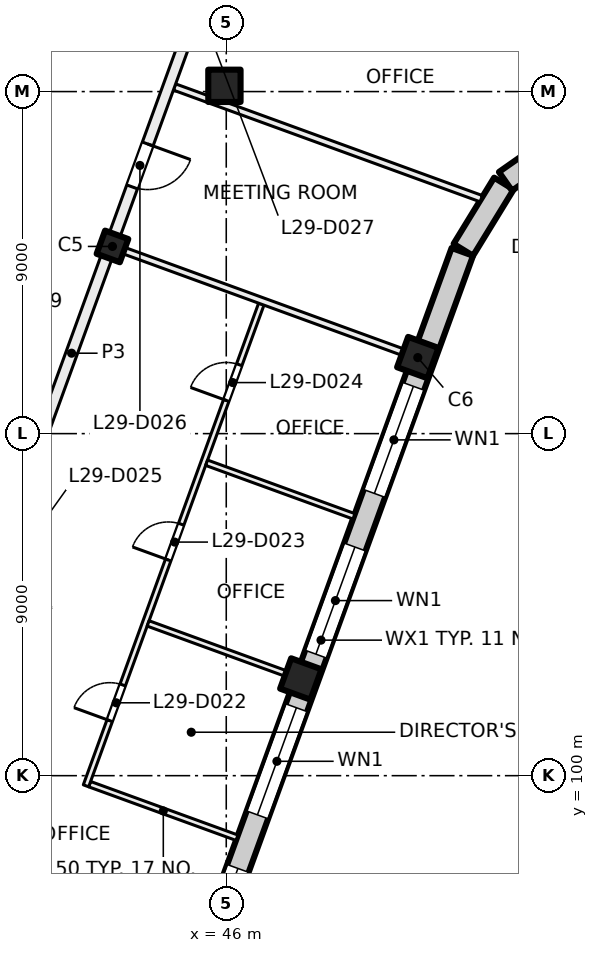
"""IFC4 building model, lengths in metres.
Left out: names, types, materials, properties, quantities, classifications, styles, units other than length and angle.
Written with IfcOpenShell. Run it as: python <this file> out.ifc"""

import sys

from ifc_helpers import new_model, si_unit, direction, frame, frame_2d, origin, origin_2d, place, context, subcontext, project, spatial, rectangle, extrude, element, fill, save


model = new_model("IFC4")
c1 = context("Model", 3, precision=1e-05, world=origin(), true_north=direction((0.0, 1.0)))
c2 = subcontext(c1, "Body", "Model", "MODEL_VIEW")
j1 = project(units=[si_unit("LENGTHUNIT", "METRE"), si_unit("PLANEANGLEUNIT", "RADIAN")], contexts=[c1])
p1 = place(None, origin())
s1 = spatial("IfcSite", under=j1, at=p1, CompositionType="ELEMENT")
p2 = place(p1, origin())
s2 = spatial("IfcBuilding", under=s1, at=p2, CompositionType="ELEMENT")
p3 = place(p2, frame((0.0, 0.0, 125.0)))
s3 = spatial("IfcBuildingStorey", under=s2, at=p3, CompositionType="ELEMENT", Elevation=125.0)
p4 = place(p3, frame((45.952, 118.152, 0.0), z_axis=(0.0, 0.0, 1.0), x_axis=(1.0, 0.0, 0.0)))
e1 = element("IfcColumn", 1, at=p4, inside=s3, PredefinedType="COLUMN", context=c2, shape_type="SweptSolid", body=[
    extrude(rectangle(XDim=0.85, YDim=0.85, at=origin_2d()), origin(), (0.0, 0.0, 1.0), 4.0),
])
p5 = place(p3, frame((43.006, 113.925, 0.0), z_axis=(0.0, 0.0, 1.0), x_axis=(-0.342020143326, -0.939692620786, 0.0)))
e2 = element("IfcColumn", 2, at=p5, inside=s3, PredefinedType="COLUMN", context=c2, shape_type="SweptSolid", body=[
    extrude(rectangle(XDim=0.65, YDim=0.65, at=origin_2d()), origin(), (0.0, 0.0, 1.0), 4.0),
])
for number, where, z_axis, x_axis in (
    (3, (51.04, 111.001, 0.0), (0.0, 0.0, 1.0), (-0.342, -0.94, 0.0)),
    (4, (47.962, 102.544, 0.0), (0.0, 0.0, 1.0), (-0.342, -0.94, 0.0)),
):
    element("IfcColumn", number, at=place(p3, frame(where, z_axis=z_axis, x_axis=x_axis)), inside=s3, PredefinedType="COLUMN", context=c2, shape_type="SweptSolid", body=[
        extrude(rectangle(XDim=0.85, YDim=0.85, at=origin_2d()), origin(), (0.0, 0.0, 1.0), 4.0),
    ])
p6 = place(p3, frame((52.212, 113.783, 0.0), z_axis=(0.0, 0.0, 1.0), x_axis=(-0.34202521188, -0.939690775968, 0.0)))
e5 = element("IfcWall", 5, at=p6, inside=s3, PredefinedType="SOLIDWALL", context=c2, shape_type="SweptSolid", body=[
    extrude(rectangle(XDim=21.745, YDim=0.6, at=frame_2d((10.873, 0.0))), origin(), (0.0, 0.0, 1.0), 3.625),
])
p7 = place(p6, frame((3.765, 0.0, 0.9)))
e6 = element("IfcOpeningElement", 6, at=p7, cuts=e5, PredefinedType="OPENING", context=c2, shape_type="SweptSolid", body=[
    extrude(rectangle(XDim=3.0, YDim=2.4, at=frame_2d((1.5, 1.2))), frame((0.0, 0.31, 0.0), z_axis=(0.0, -1.0, 0.0), x_axis=(1.0, 0.0, 0.0)), (0.0, 0.0, 1.0), 0.62),
])
p8 = place(p6, frame((8.265, 0.0, 0.9)))
e7 = element("IfcOpeningElement", 7, at=p8, cuts=e5, PredefinedType="OPENING", context=c2, shape_type="SweptSolid", body=[
    extrude(rectangle(XDim=3.0, YDim=2.4, at=frame_2d((1.5, 1.2))), frame((0.0, 0.31, 0.0), z_axis=(0.0, -1.0, 0.0), x_axis=(1.0, 0.0, 0.0)), (0.0, 0.0, 1.0), 0.62),
])
p9 = place(p6, frame((12.765, 0.0, 0.9)))
e8 = element("IfcOpeningElement", 8, at=p9, cuts=e5, PredefinedType="OPENING", context=c2, shape_type="SweptSolid", body=[
    extrude(rectangle(XDim=3.0, YDim=2.4, at=frame_2d((1.5, 1.2))), frame((0.0, 0.31, 0.0), z_axis=(0.0, -1.0, 0.0), x_axis=(1.0, 0.0, 0.0)), (0.0, 0.0, 1.0), 0.62),
])
p10 = place(p6, frame((17.265, 0.0, 0.9)))
e9 = element("IfcOpeningElement", 9, at=p10, cuts=e5, PredefinedType="OPENING", context=c2, shape_type="SweptSolid", body=[
    extrude(rectangle(XDim=3.0, YDim=2.4, at=frame_2d((1.5, 1.2))), frame((0.0, 0.31, 0.0), z_axis=(0.0, -1.0, 0.0), x_axis=(1.0, 0.0, 0.0)), (0.0, 0.0, 1.0), 0.62),
])
p11 = place(p3, frame((53.305, 115.578, 0.0), z_axis=(0.0, 0.0, 1.0), x_axis=(-0.522402266438, -0.852699168535, 0.0)))
e10 = element("IfcWall", 10, at=p11, inside=s3, PredefinedType="SOLIDWALL", context=c2, shape_type="SweptSolid", body=[
    extrude(rectangle(XDim=2.042, YDim=0.6, at=frame_2d((1.021, 0.0))), origin(), (0.0, 0.0, 1.0), 3.625),
])
p12 = place(p3, frame((55.062, 116.839, 0.0), z_axis=(0.0, 0.0, 1.0), x_axis=(-0.819122269495, -0.573618956815, 0.0)))
e11 = element("IfcWall", 11, at=p12, inside=s3, PredefinedType="SOLIDWALL", context=c2, shape_type="SweptSolid", body=[
    extrude(rectangle(XDim=2.092, YDim=0.6, at=frame_2d((1.046, 0.0))), origin(), (0.0, 0.0, 1.0), 3.625),
])
p13 = place(p3, frame((32.881, 97.657, 0.0), z_axis=(0.0, 0.0, 1.0), x_axis=(0.342017360004, 0.939693633828, 0.0)))
e12 = element("IfcWall", 12, at=p13, inside=s3, PredefinedType="PARTITIONING", context=c2, shape_type="SweptSolid", body=[
    extrude(rectangle(XDim=34.516, YDim=0.3, at=frame_2d((17.258, 0.0))), origin(), (0.0, 0.0, 1.0), 3.625),
])
p14 = place(p13, frame((4.275, 0.0, 0.0)))
e13 = element("IfcOpeningElement", 13, at=p14, cuts=e12, PredefinedType="OPENING", context=c2, shape_type="SweptSolid", body=[
    extrude(rectangle(XDim=1.2, YDim=2.1, at=frame_2d((0.6, 1.05))), frame((0.0, 0.16, 0.0), z_axis=(0.0, -1.0, 0.0), x_axis=(1.0, 0.0, 0.0)), (0.0, 0.0, 1.0), 0.32),
])
p15 = place(p13, frame((10.75, 0.0, 0.0)))
e14 = element("IfcOpeningElement", 14, at=p15, cuts=e12, PredefinedType="OPENING", context=c2, shape_type="SweptSolid", body=[
    extrude(rectangle(XDim=1.0, YDim=2.1, at=frame_2d((0.5, 1.05))), frame((0.0, 0.16, 0.0), z_axis=(0.0, -1.0, 0.0), x_axis=(1.0, 0.0, 0.0)), (0.0, 0.0, 1.0), 0.32),
])
p16 = place(p13, frame((15.25, 0.0, 0.0)))
e15 = element("IfcOpeningElement", 15, at=p16, cuts=e12, PredefinedType="OPENING", context=c2, shape_type="SweptSolid", body=[
    extrude(rectangle(XDim=1.0, YDim=2.1, at=frame_2d((0.5, 1.05))), frame((0.0, 0.16, 0.0), z_axis=(0.0, -1.0, 0.0), x_axis=(1.0, 0.0, 0.0)), (0.0, 0.0, 1.0), 0.32),
])
p17 = place(p13, frame((20.4, 0.0, 0.0)))
e16 = element("IfcOpeningElement", 16, at=p17, cuts=e12, PredefinedType="OPENING", context=c2, shape_type="SweptSolid", body=[
    extrude(rectangle(XDim=1.2, YDim=2.1, at=frame_2d((0.6, 1.05))), frame((0.0, 0.16, 0.0), z_axis=(0.0, -1.0, 0.0), x_axis=(1.0, 0.0, 0.0)), (0.0, 0.0, 1.0), 0.32),
])
p18 = place(p13, frame((25.0, 0.0, 0.0)))
e17 = element("IfcOpeningElement", 17, at=p18, cuts=e12, PredefinedType="OPENING", context=c2, shape_type="SweptSolid", body=[
    extrude(rectangle(XDim=1.0, YDim=2.1, at=frame_2d((0.5, 1.05))), frame((0.0, 0.16, 0.0), z_axis=(0.0, -1.0, 0.0), x_axis=(1.0, 0.0, 0.0)), (0.0, 0.0, 1.0), 0.32),
])
p19 = place(p3, frame((46.282, 98.367, 0.0), z_axis=(0.0, 0.0, 1.0), x_axis=(-0.939765774653, 0.341819087808, 0.0)))
e18 = element("IfcWall", 18, at=p19, inside=s3, PredefinedType="PARTITIONING", context=c2, shape_type="SweptSolid", body=[
    extrude(rectangle(XDim=4.125, YDim=0.15, at=frame_2d((2.063, 0.0))), origin(), (0.0, 0.0, 1.0), 3.625),
])
p20 = place(p3, frame((42.309, 99.733, 0.0), z_axis=(0.0, 0.0, 1.0), x_axis=(0.342023551531, 0.939691380293, 0.0)))
e19 = element("IfcWall", 19, at=p20, inside=s3, PredefinedType="PARTITIONING", context=c2, shape_type="SweptSolid", body=[
    extrude(rectangle(XDim=13.488, YDim=0.15, at=frame_2d((6.744, 0.0))), origin(), (0.0, 0.0, 1.0), 3.625),
])
p21 = place(p20, frame((1.825, 0.0, 0.0)))
e20 = element("IfcOpeningElement", 20, at=p21, cuts=e19, PredefinedType="OPENING", context=c2, shape_type="SweptSolid", body=[
    extrude(rectangle(XDim=1.0, YDim=2.1, at=frame_2d((0.5, 1.05))), frame((0.0, 0.085, 0.0), z_axis=(0.0, -1.0, 0.0), x_axis=(1.0, 0.0, 0.0)), (0.0, 0.0, 1.0), 0.17),
])
p22 = place(p20, frame((6.325, 0.0, 0.0)))
e21 = element("IfcOpeningElement", 21, at=p22, cuts=e19, PredefinedType="OPENING", context=c2, shape_type="SweptSolid", body=[
    extrude(rectangle(XDim=1.0, YDim=2.1, at=frame_2d((0.5, 1.05))), frame((0.0, 0.085, 0.0), z_axis=(0.0, -1.0, 0.0), x_axis=(1.0, 0.0, 0.0)), (0.0, 0.0, 1.0), 0.17),
])
p23 = place(p20, frame((10.791, 0.0, 0.0)))
e22 = element("IfcOpeningElement", 22, at=p23, cuts=e19, PredefinedType="OPENING", context=c2, shape_type="SweptSolid", body=[
    extrude(rectangle(XDim=1.0, YDim=2.1, at=frame_2d((0.5, 1.05))), frame((0.0, 0.085, 0.0), z_axis=(0.0, -1.0, 0.0), x_axis=(1.0, 0.0, 0.0)), (0.0, 0.0, 1.0), 0.17),
])
p24 = place(p3, frame((43.1, 113.891, 0.0), z_axis=(0.0, 0.0, 1.0), x_axis=(0.939670544866, -0.342080790328, 0.0)))
e23 = element("IfcWall", 23, at=p24, inside=s3, PredefinedType="PARTITIONING", context=c2, shape_type="SweptSolid", body=[
    extrude(rectangle(XDim=8.3, YDim=0.175, at=frame_2d((4.15, 0.0))), origin(), (0.0, 0.0, 1.0), 3.625),
])
p25 = place(p3, frame((43.944, 104.006, 0.0), z_axis=(0.0, 0.0, 1.0), x_axis=(0.939689717042, -0.34202812119, 0.0)))
e24 = element("IfcWall", 24, at=p25, inside=s3, PredefinedType="PARTITIONING", context=c2, shape_type="SweptSolid", body=[
    extrude(rectangle(XDim=4.126, YDim=0.15, at=frame_2d((2.063, 0.0))), origin(), (0.0, 0.0, 1.0), 3.625),
])
p26 = place(p3, frame((44.639, 118.12, 0.0), z_axis=(0.0, 0.0, 1.0), x_axis=(0.939669707102, -0.342083091593, 0.0)))
e25 = element("IfcWall", 25, at=p26, inside=s3, PredefinedType="PARTITIONING", context=c2, shape_type="SweptSolid", body=[
    extrude(rectangle(XDim=8.589, YDim=0.175, at=frame_2d((4.295, 0.0))), origin(), (0.0, 0.0, 1.0), 3.625),
])
p27 = place(p3, frame((45.483, 108.234, 0.0), z_axis=(0.0, 0.0, 1.0), x_axis=(0.939791695678, -0.341747814529, 0.0)))
e26 = element("IfcWall", 26, at=p27, inside=s3, PredefinedType="PARTITIONING", context=c2, shape_type="SweptSolid", body=[
    extrude(rectangle(XDim=4.125, YDim=0.15, at=frame_2d((2.063, 0.0))), origin(), (0.0, 0.0, 1.0), 3.625),
])
p28 = place(p3, frame((47.314, 125.909, 0.0), z_axis=(0.0, 0.0, 1.0), x_axis=(-0.342010770371, -0.939696032209, 0.0)))
e27 = element("IfcWall", 27, at=p28, inside=s3, PredefinedType="PARTITIONING", context=c2, shape_type="SweptSolid", body=[
    extrude(rectangle(XDim=31.485, YDim=0.3, at=frame_2d((15.742, 0.0))), origin(), (0.0, 0.0, 1.0), 3.625),
])
p29 = place(p28, frame((22.21, 0.0, 0.0)))
e28 = element("IfcOpeningElement", 28, at=p29, cuts=e27, PredefinedType="OPENING", context=c2, shape_type="SweptSolid", body=[
    extrude(rectangle(XDim=1.8, YDim=2.1, at=frame_2d((0.9, 1.05))), frame((0.0, 0.16, 0.0), z_axis=(0.0, -1.0, 0.0), x_axis=(1.0, 0.0, 0.0)), (0.0, 0.0, 1.0), 0.32),
])
p30 = place(p28, frame((9.885, 0.0, 0.0)))
e29 = element("IfcOpeningElement", 29, at=p30, cuts=e27, PredefinedType="OPENING", context=c2, shape_type="SweptSolid", body=[
    extrude(rectangle(XDim=1.2, YDim=2.1, at=frame_2d((0.6, 1.05))), frame((0.0, 0.16, 0.0), z_axis=(0.0, -1.0, 0.0), x_axis=(1.0, 0.0, 0.0)), (0.0, 0.0, 1.0), 0.32),
])
p31 = place(p28, frame((5.484, 0.0, 0.0)))
e30 = element("IfcOpeningElement", 30, at=p31, cuts=e27, PredefinedType="OPENING", context=c2, shape_type="SweptSolid", body=[
    extrude(rectangle(XDim=1.0, YDim=2.1, at=frame_2d((0.5, 1.05))), frame((0.0, 0.16, 0.0), z_axis=(0.0, -1.0, 0.0), x_axis=(1.0, 0.0, 0.0)), (0.0, 0.0, 1.0), 0.32),
])
p32 = place(p7, origin())
e31 = element("IfcWindow", 31, at=p32, inside=s3, PartitioningType="SINGLE_PANEL", PredefinedType="WINDOW", context=c2, shape_type="SweptSolid", body=[
    extrude(rectangle(XDim=3.0, YDim=2.4, at=frame_2d((1.5, 1.2))), frame((0.0, 0.03, 0.0), z_axis=(0.0, -1.0, 0.0), x_axis=(1.0, 0.0, 0.0)), (0.0, 0.0, 1.0), 0.06),
])
fill(e6, e31)
p33 = place(p8, origin())
e32 = element("IfcWindow", 32, at=p33, inside=s3, PartitioningType="SINGLE_PANEL", PredefinedType="WINDOW", context=c2, shape_type="SweptSolid", body=[
    extrude(rectangle(XDim=3.0, YDim=2.4, at=frame_2d((1.5, 1.2))), frame((0.0, 0.03, 0.0), z_axis=(0.0, -1.0, 0.0), x_axis=(1.0, 0.0, 0.0)), (0.0, 0.0, 1.0), 0.06),
])
fill(e7, e32)
p34 = place(p9, origin())
e33 = element("IfcWindow", 33, at=p34, inside=s3, PartitioningType="SINGLE_PANEL", PredefinedType="WINDOW", context=c2, shape_type="SweptSolid", body=[
    extrude(rectangle(XDim=3.0, YDim=2.4, at=frame_2d((1.5, 1.2))), frame((0.0, 0.03, 0.0), z_axis=(0.0, -1.0, 0.0), x_axis=(1.0, 0.0, 0.0)), (0.0, 0.0, 1.0), 0.06),
])
fill(e8, e33)
p35 = place(p10, origin())
e34 = element("IfcWindow", 34, at=p35, inside=s3, PartitioningType="SINGLE_PANEL", PredefinedType="WINDOW", context=c2, shape_type="SweptSolid", body=[
    extrude(rectangle(XDim=3.0, YDim=2.4, at=frame_2d((1.5, 1.2))), frame((0.0, 0.03, 0.0), z_axis=(0.0, -1.0, 0.0), x_axis=(1.0, 0.0, 0.0)), (0.0, 0.0, 1.0), 0.06),
])
fill(e9, e34)
p36 = place(p21, origin())
e35 = element("IfcDoor", 35, at=p36, inside=s3, OperationType="SINGLE_SWING_LEFT", PredefinedType="DOOR", context=c2, shape_type="SweptSolid", body=[
    extrude(rectangle(XDim=1.0, YDim=2.1, at=frame_2d((0.5, 1.05))), frame((0.0, 0.025, 0.0), z_axis=(0.0, -1.0, 0.0), x_axis=(1.0, 0.0, 0.0)), (0.0, 0.0, 1.0), 0.05),
])
fill(e20, e35)
p37 = place(p22, origin())
e36 = element("IfcDoor", 36, at=p37, inside=s3, OperationType="SINGLE_SWING_LEFT", PredefinedType="DOOR", context=c2, shape_type="SweptSolid", body=[
    extrude(rectangle(XDim=1.0, YDim=2.1, at=frame_2d((0.5, 1.05))), frame((0.0, 0.025, 0.0), z_axis=(0.0, -1.0, 0.0), x_axis=(1.0, 0.0, 0.0)), (0.0, 0.0, 1.0), 0.05),
])
fill(e21, e36)
p38 = place(p23, origin())
e37 = element("IfcDoor", 37, at=p38, inside=s3, OperationType="SINGLE_SWING_LEFT", PredefinedType="DOOR", context=c2, shape_type="SweptSolid", body=[
    extrude(rectangle(XDim=1.0, YDim=2.1, at=frame_2d((0.5, 1.05))), frame((0.0, 0.025, 0.0), z_axis=(0.0, -1.0, 0.0), x_axis=(1.0, 0.0, 0.0)), (0.0, 0.0, 1.0), 0.05),
])
fill(e22, e37)
p39 = place(p30, origin())
e38 = element("IfcDoor", 38, at=p39, inside=s3, OperationType="DOUBLE_DOOR_SINGLE_SWING", PredefinedType="DOOR", context=c2, shape_type="SweptSolid", body=[
    extrude(rectangle(XDim=1.2, YDim=2.1, at=frame_2d((0.6, 1.05))), frame((0.0, 0.025, 0.0), z_axis=(0.0, -1.0, 0.0), x_axis=(1.0, 0.0, 0.0)), (0.0, 0.0, 1.0), 0.05),
])
fill(e29, e38)
save(model, sys.argv[1])
